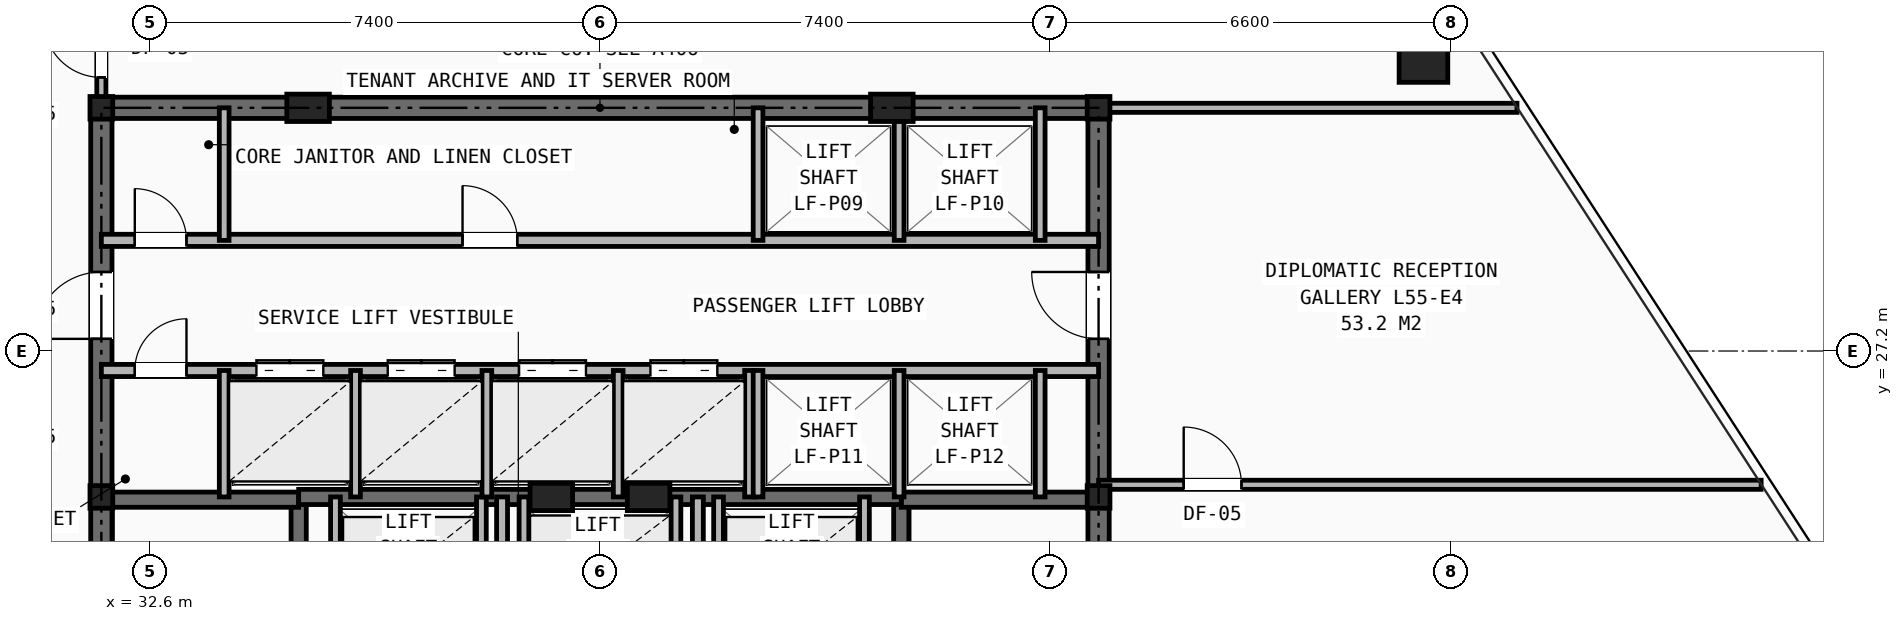
"""IFC4 building model, lengths in metres.
Left out: names, types, materials, properties, quantities, classifications, styles, units other than length and angle.
Written with IfcOpenShell. Run it as: python <this file> out.ifc"""

import sys

from ifc_helpers import new_model, si_unit, direction, frame, frame_2d, origin, origin_2d, place, context, subcontext, project, spatial, rectangle, hollow_rectangle, i_section, extrude, element, fill, save


model = new_model("IFC4")
c1 = context("Model", 3, precision=1e-05, world=origin(), true_north=direction((0.0, 1.0)))
c2 = subcontext(c1, "Body", "Model", "MODEL_VIEW")
j1 = project(units=[si_unit("LENGTHUNIT", "METRE"), si_unit("PLANEANGLEUNIT", "RADIAN")], contexts=[c1])
p1 = place(None, origin())
s1 = spatial("IfcSite", under=j1, at=p1, CompositionType="ELEMENT")
p2 = place(p1, origin())
s2 = spatial("IfcBuilding", under=s1, at=p2, CompositionType="ELEMENT")
p3 = place(p2, frame((0.0, 0.0, 193.05)))
s3 = spatial("IfcBuildingStorey", under=s2, at=p3, CompositionType="ELEMENT", Elevation=193.05)
for number, where, z_axis, x_axis in (
    (1, (31.8, 24.8, 0.0), (0.0, 0.0, 1.0), (1.0, 0.0, 0.0)),
    (2, (48.2, 24.8, 0.0), (0.0, 0.0, 1.0), (1.0, 0.0, 0.0)),
    (3, (31.8, 31.2, 0.0), (0.0, 0.0, 1.0), (1.0, 0.0, 0.0)),
    (4, (48.2, 31.2, 0.0), (0.0, 0.0, 1.0), (1.0, 0.0, 0.0)),
):
    element("IfcColumn", number, at=place(p3, frame(where, z_axis=z_axis, x_axis=x_axis)), inside=s3, PredefinedType="COLUMN", context=c2, shape_type="SweptSolid", body=[
        extrude(i_section(OverallWidth=0.374, OverallDepth=0.372, WebThickness=0.016, FlangeThickness=0.026, at=origin_2d()), origin(), (0.0, 0.0, 1.0), 3.45),
    ])
for number, where, z_axis, x_axis in (
    (5, (35.2, 31.2, 0.0), (0.0, 0.0, 1.0), (1.0, 0.0, 0.0)),
    (6, (44.8, 31.2, 0.0), (0.0, 0.0, 1.0), (1.0, 0.0, 0.0)),
    (7, (39.2, 24.8, 0.0), (0.0, 0.0, 1.0), (1.0, 0.0, 0.0)),
    (8, (40.8, 24.8, 0.0), (0.0, 0.0, 1.0), (1.0, 0.0, 0.0)),
):
    element("IfcColumn", number, at=place(p3, frame(where, z_axis=z_axis, x_axis=x_axis)), inside=s3, PredefinedType="PILASTER", context=c2, shape_type="SweptSolid", body=[
        extrude(rectangle(XDim=0.7, YDim=0.45, at=origin_2d()), origin(), (0.0, 0.0, 1.0), 3.45),
    ])
p4 = place(p3, frame((53.543, 32.019, 0.0), z_axis=(0.0, 0.0, 1.0), x_axis=(1.0, 0.0, 0.0)))
e9 = element("IfcColumn", 9, at=p4, inside=s3, PredefinedType="COLUMN", context=c2, shape_type="SweptSolid", body=[
    extrude(hollow_rectangle(XDim=0.8, YDim=0.8, WallThickness=0.055, at=origin_2d()), origin(), (0.0, 0.0, 1.0), 3.45),
])
p5 = place(p3, frame((31.8, 31.2, 0.0), z_axis=(0.0, 0.0, 1.0), x_axis=(1.0, 0.0, 0.0)))
e10 = element("IfcWall", 10, at=p5, inside=s3, PredefinedType="SHEAR", context=c2, shape_type="SweptSolid", body=[
    extrude(rectangle(XDim=16.4, YDim=0.35, at=frame_2d((8.2, 0.0))), origin(), (0.0, 0.0, 1.0), 3.03),
])
p6 = place(p3, frame((31.8, 16.4, 0.0), z_axis=(0.0, 0.0, 1.0), x_axis=(0.0, 1.0, 0.0)))
e11 = element("IfcWall", 11, at=p6, inside=s3, PredefinedType="SHEAR", context=c2, shape_type="SweptSolid", body=[
    extrude(rectangle(XDim=14.8, YDim=0.35, at=frame_2d((7.4, 0.0))), origin(), (0.0, 0.0, 1.0), 3.03),
])
p7 = place(p6, frame((11.0, 0.0, 0.0)))
e12 = element("IfcOpeningElement", 12, at=p7, cuts=e11, PredefinedType="OPENING", context=c2, shape_type="SweptSolid", body=[
    extrude(rectangle(XDim=1.1, YDim=2.15, at=frame_2d((0.55, 1.075))), frame((0.0, 0.185, 0.0), z_axis=(0.0, -1.0, 0.0), x_axis=(1.0, 0.0, 0.0)), (0.0, 0.0, 1.0), 0.37),
])
p8 = place(p3, frame((48.2, 16.4, 0.0), z_axis=(0.0, 0.0, 1.0), x_axis=(0.0, 1.0, 0.0)))
e13 = element("IfcWall", 13, at=p8, inside=s3, PredefinedType="SHEAR", context=c2, shape_type="SweptSolid", body=[
    extrude(rectangle(XDim=14.8, YDim=0.35, at=frame_2d((7.4, 0.0))), origin(), (0.0, 0.0, 1.0), 3.03),
])
p9 = place(p8, frame((11.0, 0.0, 0.0)))
e14 = element("IfcOpeningElement", 14, at=p9, cuts=e13, PredefinedType="OPENING", context=c2, shape_type="SweptSolid", body=[
    extrude(rectangle(XDim=1.1, YDim=2.15, at=frame_2d((0.55, 1.075))), frame((0.0, 0.185, 0.0), z_axis=(0.0, -1.0, 0.0), x_axis=(1.0, 0.0, 0.0)), (0.0, 0.0, 1.0), 0.37),
])
p10 = place(p3, frame((35.045, 16.4, 0.0), z_axis=(0.0, 0.0, 1.0), x_axis=(0.0, 1.0, 0.0)))
e15 = element("IfcWall", 15, at=p10, inside=s3, PredefinedType="SHEAR", context=c2, shape_type="SweptSolid", body=[
    extrude(rectangle(XDim=8.4, YDim=0.25, at=frame_2d((4.2, 0.0))), origin(), (0.0, 0.0, 1.0), 3.03),
])
p11 = place(p10, frame((0.45, 0.0, 0.0)))
e16 = element("IfcOpeningElement", 16, at=p11, cuts=e15, PredefinedType="OPENING", context=c2, shape_type="SweptSolid", body=[
    extrude(rectangle(XDim=0.95, YDim=2.1, at=frame_2d((0.475, 1.05))), frame((0.0, 0.135, 0.0), z_axis=(0.0, -1.0, 0.0), x_axis=(1.0, 0.0, 0.0)), (0.0, 0.0, 1.0), 0.27),
])
p12 = place(p3, frame((31.8, 24.755, 0.0), z_axis=(0.0, 0.0, 1.0), x_axis=(1.0, 0.0, 0.0)))
e17 = element("IfcWall", 17, at=p12, inside=s3, PredefinedType="SHEAR", context=c2, shape_type="SweptSolid", body=[
    extrude(rectangle(XDim=3.245, YDim=0.25, at=frame_2d((1.623, 0.0))), origin(), (0.0, 0.0, 1.0), 3.03),
])
p13 = place(p3, frame((44.955, 16.4, 0.0), z_axis=(0.0, 0.0, 1.0), x_axis=(0.0, 1.0, 0.0)))
e18 = element("IfcWall", 18, at=p13, inside=s3, PredefinedType="SHEAR", context=c2, shape_type="SweptSolid", body=[
    extrude(rectangle(XDim=8.4, YDim=0.25, at=frame_2d((4.2, 0.0))), origin(), (0.0, 0.0, 1.0), 3.03),
])
p14 = place(p13, frame((0.45, 0.0, 0.0)))
e19 = element("IfcOpeningElement", 19, at=p14, cuts=e18, PredefinedType="OPENING", context=c2, shape_type="SweptSolid", body=[
    extrude(rectangle(XDim=0.95, YDim=2.1, at=frame_2d((0.475, 1.05))), frame((0.0, 0.135, 0.0), z_axis=(0.0, -1.0, 0.0), x_axis=(1.0, 0.0, 0.0)), (0.0, 0.0, 1.0), 0.27),
])
p15 = place(p3, frame((44.955, 24.755, 0.0), z_axis=(0.0, 0.0, 1.0), x_axis=(1.0, 0.0, 0.0)))
e20 = element("IfcWall", 20, at=p15, inside=s3, PredefinedType="SHEAR", context=c2, shape_type="SweptSolid", body=[
    extrude(rectangle(XDim=3.245, YDim=0.25, at=frame_2d((1.623, 0.0))), origin(), (0.0, 0.0, 1.0), 3.03),
])
p16 = place(p3, frame((35.045, 24.8, 0.0), z_axis=(0.0, 0.0, 1.0), x_axis=(1.0, 0.0, 0.0)))
e21 = element("IfcWall", 21, at=p16, inside=s3, PredefinedType="SHEAR", context=c2, shape_type="SweptSolid", body=[
    extrude(rectangle(XDim=9.91, YDim=0.25, at=frame_2d((4.955, 0.0))), origin(), (0.0, 0.0, 1.0), 3.03),
])
p17 = place(p3, frame((38.39, 16.4, 0.0), z_axis=(0.0, 0.0, 1.0), x_axis=(0.0, 1.0, 0.0)))
e22 = element("IfcWall", 22, at=p17, inside=s3, PredefinedType="PARTITIONING", context=c2, shape_type="SweptSolid", body=[
    extrude(rectangle(XDim=8.4, YDim=0.18, at=frame_2d((4.2, 0.0))), origin(), (0.0, 0.0, 1.0), 2.758),
])
p18 = place(p17, frame((4.45, 0.0, 0.0)))
e23 = element("IfcOpeningElement", 23, at=p18, cuts=e22, PredefinedType="OPENING", context=c2, shape_type="SweptSolid", body=[
    extrude(rectangle(XDim=0.95, YDim=2.1, at=frame_2d((0.475, 1.05))), frame((0.0, 0.1, 0.0), z_axis=(0.0, -1.0, 0.0), x_axis=(1.0, 0.0, 0.0)), (0.0, 0.0, 1.0), 0.2),
])
p19 = place(p3, frame((41.61, 16.4, 0.0), z_axis=(0.0, 0.0, 1.0), x_axis=(0.0, 1.0, 0.0)))
e24 = element("IfcWall", 24, at=p19, inside=s3, PredefinedType="PARTITIONING", context=c2, shape_type="SweptSolid", body=[
    extrude(rectangle(XDim=8.4, YDim=0.18, at=frame_2d((4.2, 0.0))), origin(), (0.0, 0.0, 1.0), 2.758),
])
p20 = place(p19, frame((2.5, 0.0, 0.0)))
e25 = element("IfcOpeningElement", 25, at=p20, cuts=e24, PredefinedType="OPENING", context=c2, shape_type="SweptSolid", body=[
    extrude(rectangle(XDim=0.85, YDim=2.05, at=frame_2d((0.425, 1.025))), frame((0.0, 0.1, 0.0), z_axis=(0.0, -1.0, 0.0), x_axis=(1.0, 0.0, 0.0)), (0.0, 0.0, 1.0), 0.2),
])
for number, where, z_axis, x_axis in (
    (26, (35.65, 22.48, 0.0), (0.0, 0.0, 1.0), (0.0, 1.0, 0.0)),
    (27, (38.05, 22.48, 0.0), (0.0, 0.0, 1.0), (0.0, 1.0, 0.0)),
    (28, (41.95, 22.48, 0.0), (0.0, 0.0, 1.0), (0.0, 1.0, 0.0)),
    (29, (44.35, 22.48, 0.0), (0.0, 0.0, 1.0), (0.0, 1.0, 0.0)),
    (30, (38.75, 22.48, 0.0), (0.0, 0.0, 1.0), (0.0, 1.0, 0.0)),
    (31, (41.25, 22.48, 0.0), (0.0, 0.0, 1.0), (0.0, 1.0, 0.0)),
):
    element("IfcWall", number, at=place(p3, frame(where, z_axis=z_axis, x_axis=x_axis)), inside=s3, PredefinedType="SOLIDWALL", context=c2, shape_type="SweptSolid", body=[
        extrude(rectangle(XDim=2.32, YDim=0.16, at=frame_2d((1.16, 0.0))), origin(), (0.0, 0.0, 1.0), 3.03),
    ])
p21 = place(p3, frame((31.8, 29.02, 0.0), z_axis=(0.0, 0.0, 1.0), x_axis=(1.0, 0.0, 0.0)))
e32 = element("IfcWall", 32, at=p21, inside=s3, PredefinedType="SOLIDWALL", context=c2, shape_type="SweptSolid", body=[
    extrude(rectangle(XDim=16.4, YDim=0.2, at=frame_2d((8.2, 0.0))), origin(), (0.0, 0.0, 1.0), 2.485),
])
p22 = place(p21, frame((0.55, 0.0, 0.0)))
e33 = element("IfcOpeningElement", 33, at=p22, cuts=e32, PredefinedType="OPENING", context=c2, shape_type="SweptSolid", body=[
    extrude(rectangle(XDim=0.85, YDim=2.05, at=frame_2d((0.425, 1.025))), frame((0.0, 0.11, 0.0), z_axis=(0.0, -1.0, 0.0), x_axis=(1.0, 0.0, 0.0)), (0.0, 0.0, 1.0), 0.22),
])
p23 = place(p21, frame((5.94, 0.0, 0.0)))
e34 = element("IfcOpeningElement", 34, at=p23, cuts=e32, PredefinedType="OPENING", context=c2, shape_type="SweptSolid", body=[
    extrude(rectangle(XDim=0.9, YDim=2.1, at=frame_2d((0.45, 1.05))), frame((0.0, 0.11, 0.0), z_axis=(0.0, -1.0, 0.0), x_axis=(1.0, 0.0, 0.0)), (0.0, 0.0, 1.0), 0.22),
])
p24 = place(p3, frame((31.8, 26.88, 0.0), z_axis=(0.0, 0.0, 1.0), x_axis=(1.0, 0.0, 0.0)))
e35 = element("IfcWall", 35, at=p24, inside=s3, PredefinedType="SOLIDWALL", context=c2, shape_type="SweptSolid", body=[
    extrude(rectangle(XDim=16.4, YDim=0.2, at=frame_2d((8.2, 0.0))), origin(), (0.0, 0.0, 1.0), 2.485),
])
p25 = place(p24, frame((0.55, 0.0, 0.0)))
e36 = element("IfcOpeningElement", 36, at=p25, cuts=e35, PredefinedType="OPENING", context=c2, shape_type="SweptSolid", body=[
    extrude(rectangle(XDim=0.85, YDim=2.05, at=frame_2d((0.425, 1.025))), frame((0.0, 0.11, 0.0), z_axis=(0.0, -1.0, 0.0), x_axis=(1.0, 0.0, 0.0)), (0.0, 0.0, 1.0), 0.22),
])
p26 = place(p24, frame((2.55, 0.0, 0.0)))
e37 = element("IfcOpeningElement", 37, at=p26, cuts=e35, PredefinedType="OPENING", context=c2, shape_type="SweptSolid", body=[
    extrude(rectangle(XDim=1.1, YDim=2.15, at=frame_2d((0.55, 1.075))), frame((0.0, 0.11, 0.0), z_axis=(0.0, -1.0, 0.0), x_axis=(1.0, 0.0, 0.0)), (0.0, 0.0, 1.0), 0.22),
])
p27 = place(p24, frame((4.71, 0.0, 0.0)))
e38 = element("IfcOpeningElement", 38, at=p27, cuts=e35, PredefinedType="OPENING", context=c2, shape_type="SweptSolid", body=[
    extrude(rectangle(XDim=1.1, YDim=2.15, at=frame_2d((0.55, 1.075))), frame((0.0, 0.11, 0.0), z_axis=(0.0, -1.0, 0.0), x_axis=(1.0, 0.0, 0.0)), (0.0, 0.0, 1.0), 0.22),
])
p28 = place(p24, frame((6.87, 0.0, 0.0)))
e39 = element("IfcOpeningElement", 39, at=p28, cuts=e35, PredefinedType="OPENING", context=c2, shape_type="SweptSolid", body=[
    extrude(rectangle(XDim=1.1, YDim=2.15, at=frame_2d((0.55, 1.075))), frame((0.0, 0.11, 0.0), z_axis=(0.0, -1.0, 0.0), x_axis=(1.0, 0.0, 0.0)), (0.0, 0.0, 1.0), 0.22),
])
p29 = place(p24, frame((9.03, 0.0, 0.0)))
e40 = element("IfcOpeningElement", 40, at=p29, cuts=e35, PredefinedType="OPENING", context=c2, shape_type="SweptSolid", body=[
    extrude(rectangle(XDim=1.1, YDim=2.15, at=frame_2d((0.55, 1.075))), frame((0.0, 0.11, 0.0), z_axis=(0.0, -1.0, 0.0), x_axis=(1.0, 0.0, 0.0)), (0.0, 0.0, 1.0), 0.22),
])
p30 = place(p3, frame((33.82, 29.02, 0.0), z_axis=(0.0, 0.0, 1.0), x_axis=(0.0, 1.0, 0.0)))
e41 = element("IfcWall", 41, at=p30, inside=s3, PredefinedType="SOLIDWALL", context=c2, shape_type="SweptSolid", body=[
    extrude(rectangle(XDim=2.18, YDim=0.16, at=frame_2d((1.09, 0.0))), origin(), (0.0, 0.0, 1.0), 2.758),
])
for number, where, z_axis, x_axis in (
    (42, (33.82, 24.8, 0.0), (0.0, 0.0, 1.0), (0.0, 1.0, 0.0)),
    (43, (35.98, 24.8, 0.0), (0.0, 0.0, 1.0), (0.0, 1.0, 0.0)),
    (44, (38.14, 24.8, 0.0), (0.0, 0.0, 1.0), (0.0, 1.0, 0.0)),
    (45, (40.3, 24.8, 0.0), (0.0, 0.0, 1.0), (0.0, 1.0, 0.0)),
    (46, (42.46, 24.8, 0.0), (0.0, 0.0, 1.0), (0.0, 1.0, 0.0)),
):
    element("IfcWall", number, at=place(p3, frame(where, z_axis=z_axis, x_axis=x_axis)), inside=s3, PredefinedType="SOLIDWALL", context=c2, shape_type="SweptSolid", body=[
        extrude(rectangle(XDim=2.08, YDim=0.16, at=frame_2d((1.04, 0.0))), origin(), (0.0, 0.0, 1.0), 3.03),
    ])
for number, where, z_axis, x_axis in (
    (47, (42.6, 29.02, 0.0), (0.0, 0.0, 1.0), (0.0, 1.0, 0.0)),
    (48, (44.92, 29.02, 0.0), (0.0, 0.0, 1.0), (0.0, 1.0, 0.0)),
    (49, (47.24, 29.02, 0.0), (0.0, 0.0, 1.0), (0.0, 1.0, 0.0)),
):
    element("IfcWall", number, at=place(p3, frame(where, z_axis=z_axis, x_axis=x_axis)), inside=s3, PredefinedType="SOLIDWALL", context=c2, shape_type="SweptSolid", body=[
        extrude(rectangle(XDim=2.18, YDim=0.16, at=frame_2d((1.09, 0.0))), origin(), (0.0, 0.0, 1.0), 2.758),
    ])
for number, where, z_axis, x_axis in (
    (50, (42.6, 24.8, 0.0), (0.0, 0.0, 1.0), (0.0, 1.0, 0.0)),
    (51, (44.92, 24.8, 0.0), (0.0, 0.0, 1.0), (0.0, 1.0, 0.0)),
    (52, (47.24, 24.8, 0.0), (0.0, 0.0, 1.0), (0.0, 1.0, 0.0)),
):
    element("IfcWall", number, at=place(p3, frame(where, z_axis=z_axis, x_axis=x_axis)), inside=s3, PredefinedType="SOLIDWALL", context=c2, shape_type="SweptSolid", body=[
        extrude(rectangle(XDim=2.08, YDim=0.16, at=frame_2d((1.04, 0.0))), origin(), (0.0, 0.0, 1.0), 3.03),
    ])
p31 = place(p3, frame((31.8, 31.2, 0.0), z_axis=(0.0, 0.0, 1.0), x_axis=(0.0, 1.0, 0.0)))
e53 = element("IfcWall", 53, at=p31, inside=s3, PredefinedType="PARTITIONING", context=c2, shape_type="SweptSolid", body=[
    extrude(rectangle(XDim=5.3, YDim=0.15, at=frame_2d((2.65, 0.0))), origin(), (0.0, 0.0, 1.0), 2.241),
])
p32 = place(p31, frame((0.5, 0.0, 0.0)))
e54 = element("IfcOpeningElement", 54, at=p32, cuts=e53, PredefinedType="OPENING", context=c2, shape_type="SweptSolid", body=[
    extrude(rectangle(XDim=0.95, YDim=2.1, at=frame_2d((0.475, 1.05))), frame((0.0, 0.085, 0.0), z_axis=(0.0, -1.0, 0.0), x_axis=(1.0, 0.0, 0.0)), (0.0, 0.0, 1.0), 0.17),
])
p33 = place(p31, frame((4.23, 0.0, 0.0)))
e55 = element("IfcOpeningElement", 55, at=p33, cuts=e53, PredefinedType="OPENING", context=c2, shape_type="SweptSolid", body=[
    extrude(rectangle(XDim=0.95, YDim=2.1, at=frame_2d((0.475, 1.05))), frame((0.0, 0.085, 0.0), z_axis=(0.0, -1.0, 0.0), x_axis=(1.0, 0.0, 0.0)), (0.0, 0.0, 1.0), 0.17),
])
p34 = place(p3, frame((48.2, 31.2, 0.0), z_axis=(0.0, 0.0, 1.0), x_axis=(1.0, 0.0, 0.0)))
e56 = element("IfcWall", 56, at=p34, inside=s3, PredefinedType="PARTITIONING", context=c2, shape_type="SweptSolid", body=[
    extrude(rectangle(XDim=6.881, YDim=0.15, at=frame_2d((3.44, 0.0))), origin(), (0.0, 0.0, 1.0), 2.241),
])
p35 = place(p3, frame((48.2, 25.0, 0.0), z_axis=(0.0, 0.0, 1.0), x_axis=(1.0, 0.0, 0.0)))
e57 = element("IfcWall", 57, at=p35, inside=s3, PredefinedType="PARTITIONING", context=c2, shape_type="SweptSolid", body=[
    extrude(rectangle(XDim=10.896, YDim=0.15, at=frame_2d((5.448, 0.0))), origin(), (0.0, 0.0, 1.0), 2.161),
])
p36 = place(p35, frame((1.4, 0.0, 0.0)))
e58 = element("IfcOpeningElement", 58, at=p36, cuts=e57, PredefinedType="OPENING", context=c2, shape_type="SweptSolid", body=[
    extrude(rectangle(XDim=0.95, YDim=2.1, at=frame_2d((0.475, 1.05))), frame((0.0, 0.085, 0.0), z_axis=(0.0, -1.0, 0.0), x_axis=(1.0, 0.0, 0.0)), (0.0, 0.0, 1.0), 0.17),
])
p37 = place(p22, origin())
e59 = element("IfcDoor", 59, at=p37, inside=s3, OperationType="SINGLE_SWING_LEFT", PredefinedType="DOOR", context=c2, shape_type="SweptSolid", body=[
    extrude(rectangle(XDim=0.85, YDim=2.05, at=frame_2d((0.425, 1.025))), frame((0.0, 0.025, 0.0), z_axis=(0.0, -1.0, 0.0), x_axis=(1.0, 0.0, 0.0)), (0.0, 0.0, 1.0), 0.05),
])
fill(e33, e59)
p38 = place(p25, origin())
e60 = element("IfcDoor", 60, at=p38, inside=s3, OperationType="SINGLE_SWING_RIGHT", PredefinedType="DOOR", context=c2, shape_type="SweptSolid", body=[
    extrude(rectangle(XDim=0.85, YDim=2.05, at=frame_2d((0.425, 1.025))), frame((0.0, 0.025, 0.0), z_axis=(0.0, -1.0, 0.0), x_axis=(1.0, 0.0, 0.0)), (0.0, 0.0, 1.0), 0.05),
])
fill(e36, e60)
p39 = place(p7, origin())
e61 = element("IfcDoor", 61, at=p39, inside=s3, OperationType="SINGLE_SWING_LEFT", PredefinedType="DOOR", context=c2, shape_type="SweptSolid", body=[
    extrude(rectangle(XDim=1.1, YDim=2.15, at=frame_2d((0.55, 1.075))), frame((0.0, 0.025, 0.0), z_axis=(0.0, -1.0, 0.0), x_axis=(1.0, 0.0, 0.0)), (0.0, 0.0, 1.0), 0.05),
])
fill(e12, e61)
p40 = place(p9, origin())
e62 = element("IfcDoor", 62, at=p40, inside=s3, OperationType="SINGLE_SWING_RIGHT", PredefinedType="DOOR", context=c2, shape_type="SweptSolid", body=[
    extrude(rectangle(XDim=1.1, YDim=2.15, at=frame_2d((0.55, 1.075))), frame((0.0, 0.025, 0.0), z_axis=(0.0, -1.0, 0.0), x_axis=(1.0, 0.0, 0.0)), (0.0, 0.0, 1.0), 0.05),
])
fill(e14, e62)
p41 = place(p23, origin())
e63 = element("IfcDoor", 63, at=p41, inside=s3, OperationType="SINGLE_SWING_LEFT", PredefinedType="DOOR", context=c2, shape_type="SweptSolid", body=[
    extrude(rectangle(XDim=0.9, YDim=2.1, at=frame_2d((0.45, 1.05))), frame((0.0, 0.025, 0.0), z_axis=(0.0, -1.0, 0.0), x_axis=(1.0, 0.0, 0.0)), (0.0, 0.0, 1.0), 0.05),
])
fill(e34, e63)
p42 = place(p26, origin())
e64 = element("IfcDoor", 64, at=p42, inside=s3, OperationType="DOUBLE_DOOR_SLIDING", PredefinedType="DOOR", context=c2, shape_type="SweptSolid", body=[
    extrude(rectangle(XDim=1.1, YDim=2.15, at=frame_2d((0.55, 1.075))), frame((0.0, 0.025, 0.0), z_axis=(0.0, -1.0, 0.0), x_axis=(1.0, 0.0, 0.0)), (0.0, 0.0, 1.0), 0.05),
])
fill(e37, e64)
p43 = place(p27, origin())
e65 = element("IfcDoor", 65, at=p43, inside=s3, OperationType="DOUBLE_DOOR_SLIDING", PredefinedType="DOOR", context=c2, shape_type="SweptSolid", body=[
    extrude(rectangle(XDim=1.1, YDim=2.15, at=frame_2d((0.55, 1.075))), frame((0.0, 0.025, 0.0), z_axis=(0.0, -1.0, 0.0), x_axis=(1.0, 0.0, 0.0)), (0.0, 0.0, 1.0), 0.05),
])
fill(e38, e65)
p44 = place(p28, origin())
e66 = element("IfcDoor", 66, at=p44, inside=s3, OperationType="DOUBLE_DOOR_SLIDING", PredefinedType="DOOR", context=c2, shape_type="SweptSolid", body=[
    extrude(rectangle(XDim=1.1, YDim=2.15, at=frame_2d((0.55, 1.075))), frame((0.0, 0.025, 0.0), z_axis=(0.0, -1.0, 0.0), x_axis=(1.0, 0.0, 0.0)), (0.0, 0.0, 1.0), 0.05),
])
fill(e39, e66)
p45 = place(p29, origin())
e67 = element("IfcDoor", 67, at=p45, inside=s3, OperationType="DOUBLE_DOOR_SLIDING", PredefinedType="DOOR", context=c2, shape_type="SweptSolid", body=[
    extrude(rectangle(XDim=1.1, YDim=2.15, at=frame_2d((0.55, 1.075))), frame((0.0, 0.025, 0.0), z_axis=(0.0, -1.0, 0.0), x_axis=(1.0, 0.0, 0.0)), (0.0, 0.0, 1.0), 0.05),
])
fill(e40, e67)
p46 = place(p32, origin())
e68 = element("IfcDoor", 68, at=p46, inside=s3, OperationType="SINGLE_SWING_RIGHT", PredefinedType="DOOR", context=c2, shape_type="SweptSolid", body=[
    extrude(rectangle(XDim=0.95, YDim=2.1, at=frame_2d((0.475, 1.05))), frame((0.0, 0.025, 0.0), z_axis=(0.0, -1.0, 0.0), x_axis=(1.0, 0.0, 0.0)), (0.0, 0.0, 1.0), 0.05),
])
fill(e54, e68)
p47 = place(p36, origin())
e69 = element("IfcDoor", 69, at=p47, inside=s3, OperationType="SINGLE_SWING_LEFT", PredefinedType="DOOR", context=c2, shape_type="SweptSolid", body=[
    extrude(rectangle(XDim=0.95, YDim=2.1, at=frame_2d((0.475, 1.05))), frame((0.0, 0.025, 0.0), z_axis=(0.0, -1.0, 0.0), x_axis=(1.0, 0.0, 0.0)), (0.0, 0.0, 1.0), 0.05),
])
fill(e58, e69)
save(model, sys.argv[1])
